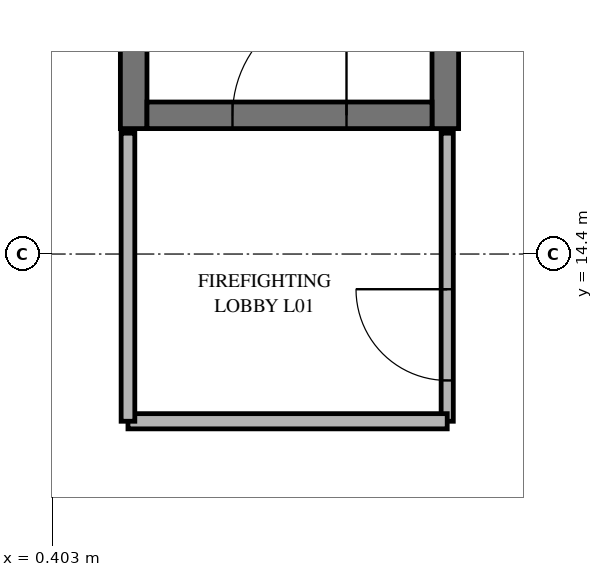
"""IFC4 building model, lengths in metres.
Left out: names, types, materials, properties, quantities, classifications, styles, units other than length and angle.
Written with IfcOpenShell. Run it as: python <this file> out.ifc"""

import sys

from ifc_helpers import new_model, si_unit, direction, frame, frame_2d, origin, place, context, subcontext, project, spatial, rectangle, extrude, element, fill, save


model = new_model("IFC4")
c1 = context("Model", 3, precision=1e-05, world=origin(), true_north=direction((0.0, 1.0)))
c2 = subcontext(c1, "Body", "Model", "MODEL_VIEW")
j1 = project(units=[si_unit("LENGTHUNIT", "METRE"), si_unit("PLANEANGLEUNIT", "RADIAN")], contexts=[c1])
p1 = place(None, origin())
s1 = spatial("IfcSite", under=j1, at=p1, CompositionType="ELEMENT")
p2 = place(p1, origin())
s2 = spatial("IfcBuilding", under=s1, at=p2, CompositionType="ELEMENT")
p3 = place(p2, frame((0.0, 0.0, 4.5)))
s3 = spatial("IfcBuildingStorey", under=s2, at=p3, CompositionType="ELEMENT", Elevation=4.5)
for number, where, z_axis, x_axis in (
    (1, (5.575, 16.05, 0.0), (0.0, 0.0, 1.0), (0.0, 1.0, 0.0)),
    (2, (1.475, 25.15, 0.0), (0.0, 0.0, 1.0), (0.0, -1.0, 0.0)),
):
    element("IfcWall", number, at=place(p3, frame(where, z_axis=z_axis, x_axis=x_axis)), inside=s3, PredefinedType="SHEAR", context=c2, shape_type="SweptSolid", body=[
        extrude(rectangle(XDim=9.1, YDim=0.35, at=frame_2d((4.55, 0.0))), origin(), (0.0, 0.0, 1.0), 3.95),
    ])
p4 = place(p3, frame((1.65, 16.225, 0.0), z_axis=(0.0, 0.0, 1.0), x_axis=(1.0, 0.0, 0.0)))
e3 = element("IfcWall", 3, at=p4, inside=s3, PredefinedType="SHEAR", context=c2, shape_type="SweptSolid", body=[
    extrude(rectangle(XDim=3.75, YDim=0.35, at=frame_2d((1.875, 0.0))), origin(), (0.0, 0.0, 1.0), 3.95),
])
p5 = place(p4, frame((1.125, 0.0, 0.0)))
e4 = element("IfcOpeningElement", 4, at=p5, cuts=e3, PredefinedType="OPENING", context=c2, shape_type="SweptSolid", body=[
    extrude(rectangle(XDim=1.5, YDim=2.2, at=frame_2d((0.75, 1.1))), frame((0.0, 0.185, 0.0), z_axis=(0.0, -1.0, 0.0), x_axis=(1.0, 0.0, 0.0)), (0.0, 0.0, 1.0), 0.37),
])
p6 = place(p3, frame((5.6, 12.2, 0.0), z_axis=(0.0, 0.0, 1.0), x_axis=(0.0, 1.0, 0.0)))
e5 = element("IfcWall", 5, at=p6, inside=s3, PredefinedType="PARTITIONING", context=c2, shape_type="SweptSolid", body=[
    extrude(rectangle(XDim=3.79, YDim=0.16, at=frame_2d((1.895, 0.0))), origin(), (0.0, 0.0, 1.0), 3.3),
])
p7 = place(p6, frame((0.537, 0.0, 0.0)))
e6 = element("IfcOpeningElement", 6, at=p7, cuts=e5, PredefinedType="OPENING", context=c2, shape_type="SweptSolid", body=[
    extrude(rectangle(XDim=1.2, YDim=2.2, at=frame_2d((0.6, 1.1))), frame((0.0, 0.09, 0.0), z_axis=(0.0, -1.0, 0.0), x_axis=(1.0, 0.0, 0.0)), (0.0, 0.0, 1.0), 0.18),
])
p8 = place(p3, frame((1.4, 12.2, 0.0), z_axis=(0.0, 0.0, 1.0), x_axis=(1.0, 0.0, 0.0)))
e7 = element("IfcWall", 7, at=p8, inside=s3, PredefinedType="PARTITIONING", context=c2, shape_type="SweptSolid", body=[
    extrude(rectangle(XDim=4.2, YDim=0.2, at=frame_2d((2.1, 0.0))), origin(), (0.0, 0.0, 1.0), 3.95),
])
p9 = place(p3, frame((1.4, 15.99, 0.0), z_axis=(0.0, 0.0, 1.0), x_axis=(0.0, -1.0, 0.0)))
e8 = element("IfcWall", 8, at=p9, inside=s3, PredefinedType="PARTITIONING", context=c2, shape_type="SweptSolid", body=[
    extrude(rectangle(XDim=3.79, YDim=0.18, at=frame_2d((1.895, 0.0))), origin(), (0.0, 0.0, 1.0), 3.3),
])
p10 = place(p5, origin())
e9 = element("IfcDoor", 9, at=p10, inside=s3, OperationType="SINGLE_SWING_RIGHT", PredefinedType="DOOR", context=c2, shape_type="SweptSolid", body=[
    extrude(rectangle(XDim=1.5, YDim=2.2, at=frame_2d((0.75, 1.1))), frame((0.0, 0.025, 0.0), z_axis=(0.0, -1.0, 0.0), x_axis=(1.0, 0.0, 0.0)), (0.0, 0.0, 1.0), 0.05),
])
fill(e4, e9)
p11 = place(p7, origin())
e10 = element("IfcDoor", 10, at=p11, inside=s3, OperationType="SINGLE_SWING_RIGHT", PredefinedType="DOOR", context=c2, shape_type="SweptSolid", body=[
    extrude(rectangle(XDim=1.2, YDim=2.2, at=frame_2d((0.6, 1.1))), frame((0.0, 0.025, 0.0), z_axis=(0.0, -1.0, 0.0), x_axis=(1.0, 0.0, 0.0)), (0.0, 0.0, 1.0), 0.05),
])
fill(e6, e10)
save(model, sys.argv[1])
